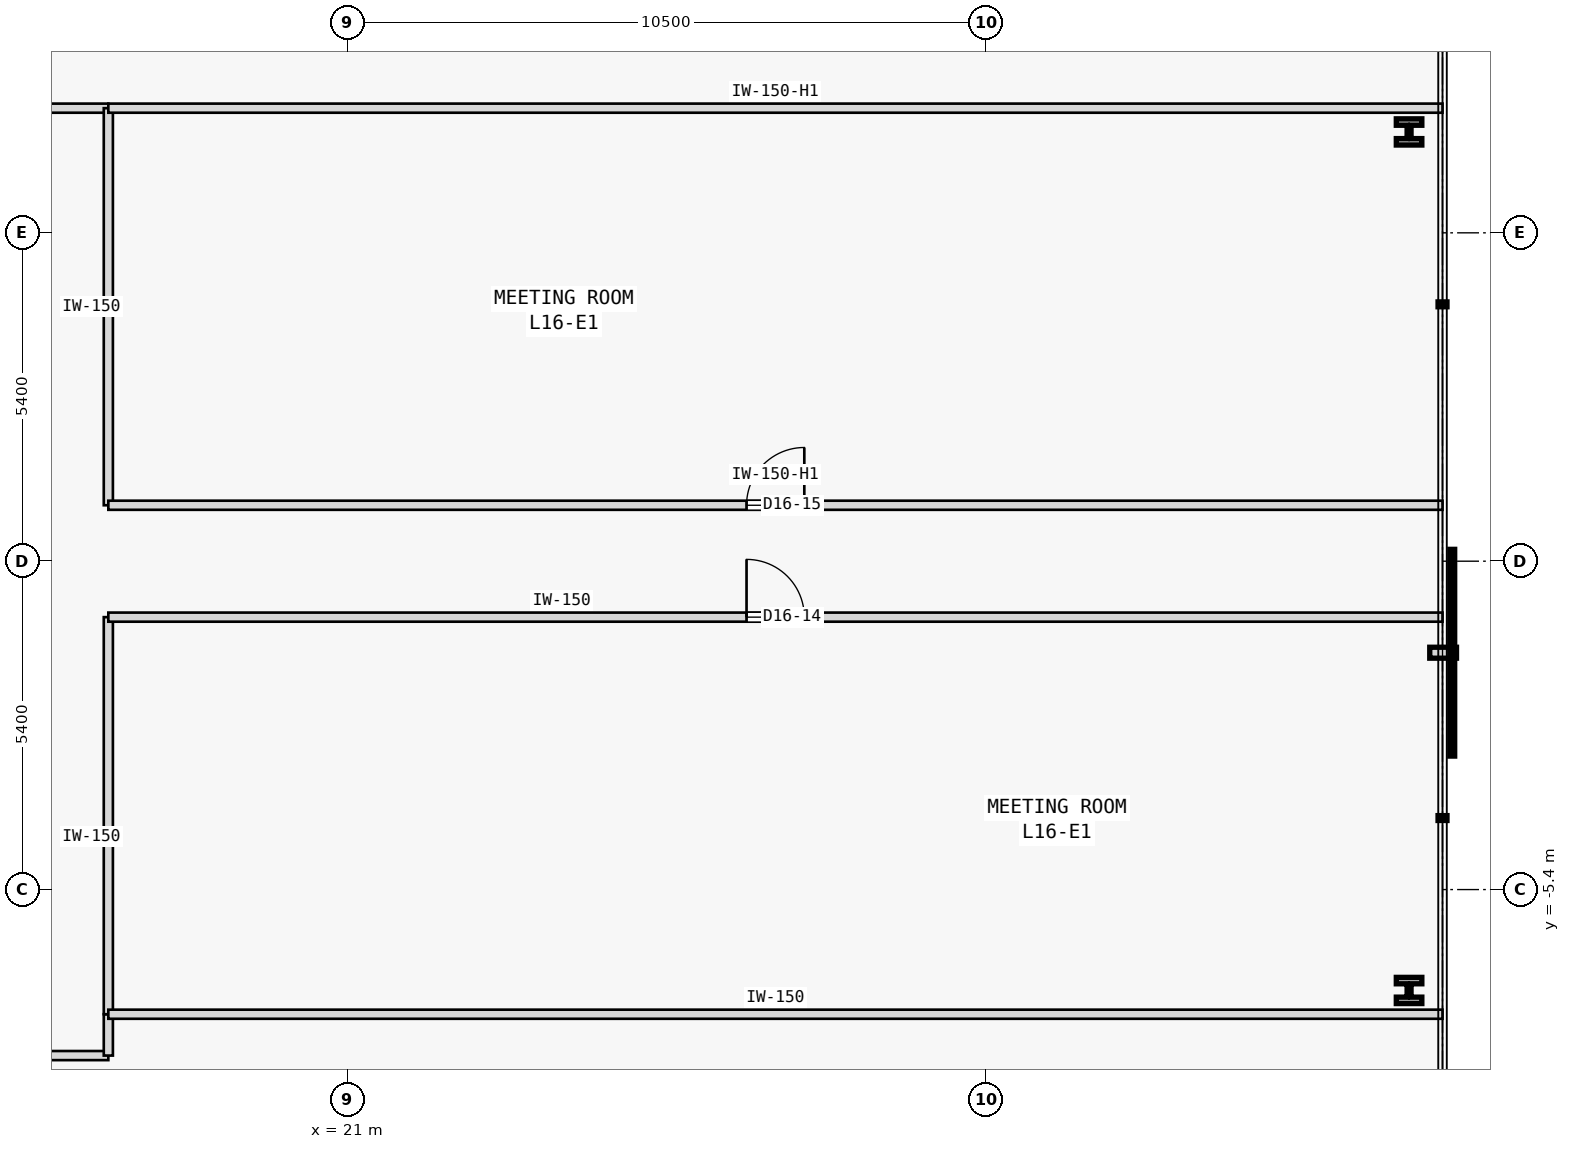
"""IFC4 building model, lengths in metres.
Left out: names, types, materials, properties, quantities, classifications, styles, units other than length and angle.
Written with IfcOpenShell. Run it as: python <this file> out.ifc"""

import sys

from ifc_helpers import new_model, si_unit, direction, frame, frame_2d, origin, origin_2d, place, context, subcontext, project, spatial, rectangle, i_section, extrude, element, fill, save


model = new_model("IFC4")
c1 = context("Model", 3, precision=1e-05, world=origin(), true_north=direction((0.0, 1.0)))
c2 = subcontext(c1, "Body", "Model", "MODEL_VIEW")
j1 = project(units=[si_unit("LENGTHUNIT", "METRE"), si_unit("PLANEANGLEUNIT", "RADIAN")], contexts=[c1])
p1 = place(None, origin())
s1 = spatial("IfcSite", under=j1, at=p1, CompositionType="ELEMENT")
p2 = place(p1, origin())
s2 = spatial("IfcBuilding", under=s1, at=p2, CompositionType="ELEMENT")
p3 = place(p2, frame((0.0, 0.0, 67.4)))
s3 = spatial("IfcBuildingStorey", under=s2, at=p3, CompositionType="ELEMENT", Elevation=67.4)
for number, where, z_axis, x_axis in (
    (1, (38.45, -7.059, 0.0), (0.0, 0.0, 1.0), (1.0, 0.0, 0.0)),
    (2, (38.45, 7.059, 0.0), (0.0, 0.0, 1.0), (1.0, 0.0, 0.0)),
):
    element("IfcColumn", number, at=place(p3, frame(where, z_axis=z_axis, x_axis=x_axis)), inside=s3, PredefinedType="COLUMN", context=c2, shape_type="SweptSolid", body=[
        extrude(i_section(OverallWidth=0.42, OverallDepth=0.431, WebThickness=0.065, FlangeThickness=0.106, FilletRadius=0.015, at=origin_2d()), origin(), (0.0, 0.0, 1.0), 3.8),
    ])
for number, where, z_axis, x_axis in (
    (3, (0.92, 7.45, 0.0), (0.0, 0.0, 1.0), (1.0, 0.0, 0.0)),
    (4, (0.92, -8.13, 0.0), (0.0, 0.0, 1.0), (1.0, 0.0, 0.0)),
):
    element("IfcWall", number, at=place(p3, frame(where, z_axis=z_axis, x_axis=x_axis)), inside=s3, PredefinedType="PARTITIONING", context=c2, shape_type="SweptSolid", body=[
        extrude(rectangle(XDim=16.139, YDim=0.15, at=frame_2d((8.07, 0.0))), origin(), (0.0, 0.0, 1.0), 3.575),
    ])
p4 = place(p3, frame((17.059, -8.13, 0.0), z_axis=(0.0, 0.0, 1.0), x_axis=(0.0, 1.0, 0.0)))
e5 = element("IfcWall", 5, at=p4, inside=s3, PredefinedType="PARTITIONING", context=c2, shape_type="SweptSolid", body=[
    extrude(rectangle(XDim=0.68, YDim=0.15, at=frame_2d((0.34, 0.0))), origin(), (0.0, 0.0, 1.0), 3.575),
])
p5 = place(p3, frame((17.059, -7.45, 0.0), z_axis=(0.0, 0.0, 1.0), x_axis=(0.0, 1.0, 0.0)))
e6 = element("IfcWall", 6, at=p5, inside=s3, PredefinedType="PARTITIONING", context=c2, shape_type="SweptSolid", body=[
    extrude(rectangle(XDim=6.53, YDim=0.15, at=frame_2d((3.265, 0.0))), origin(), (0.0, 0.0, 1.0), 3.575),
])
p6 = place(p3, frame((17.059, -0.92, 0.0), z_axis=(0.0, 0.0, 1.0), x_axis=(1.0, 0.0, 0.0)))
e7 = element("IfcWall", 7, at=p6, inside=s3, PredefinedType="PARTITIONING", context=c2, shape_type="SweptSolid", body=[
    extrude(rectangle(XDim=21.941, YDim=0.15, at=frame_2d((10.97, 0.0))), origin(), (0.0, 0.0, 1.0), 3.575),
])
p7 = place(p6, frame((10.496, 0.0, 0.0)))
e8 = element("IfcOpeningElement", 8, at=p7, cuts=e7, PredefinedType="OPENING", context=c2, shape_type="SweptSolid", body=[
    extrude(rectangle(XDim=0.95, YDim=2.15, at=frame_2d((0.475, 1.075))), frame((0.0, 0.085, 0.0), z_axis=(0.0, -1.0, 0.0), x_axis=(1.0, 0.0, 0.0)), (0.0, 0.0, 1.0), 0.17),
])
p8 = place(p3, frame((17.059, 0.92, 0.0), z_axis=(0.0, 0.0, 1.0), x_axis=(0.0, 1.0, 0.0)))
e9 = element("IfcWall", 9, at=p8, inside=s3, PredefinedType="PARTITIONING", context=c2, shape_type="SweptSolid", body=[
    extrude(rectangle(XDim=6.53, YDim=0.15, at=frame_2d((3.265, 0.0))), origin(), (0.0, 0.0, 1.0), 3.575),
])
p9 = place(p3, frame((17.059, 0.92, 0.0), z_axis=(0.0, 0.0, 1.0), x_axis=(1.0, 0.0, 0.0)))
e10 = element("IfcWall", 10, at=p9, inside=s3, PredefinedType="PARTITIONING", context=c2, shape_type="SweptSolid", body=[
    extrude(rectangle(XDim=21.941, YDim=0.15, at=frame_2d((10.97, 0.0))), origin(), (0.0, 0.0, 1.0), 3.125),
])
p10 = place(p9, frame((10.496, 0.0, 0.0)))
e11 = element("IfcOpeningElement", 11, at=p10, cuts=e10, PredefinedType="OPENING", context=c2, shape_type="SweptSolid", body=[
    extrude(rectangle(XDim=0.95, YDim=2.15, at=frame_2d((0.475, 1.075))), frame((0.0, 0.085, 0.0), z_axis=(0.0, -1.0, 0.0), x_axis=(1.0, 0.0, 0.0)), (0.0, 0.0, 1.0), 0.17),
])
p11 = place(p3, frame((17.059, 7.45, 0.0), z_axis=(0.0, 0.0, 1.0), x_axis=(1.0, 0.0, 0.0)))
e12 = element("IfcWall", 12, at=p11, inside=s3, PredefinedType="PARTITIONING", context=c2, shape_type="SweptSolid", body=[
    extrude(rectangle(XDim=21.941, YDim=0.15, at=frame_2d((10.97, 0.0))), origin(), (0.0, 0.0, 1.0), 3.125),
])
p12 = place(p3, frame((17.059, -7.45, 0.0), z_axis=(0.0, 0.0, 1.0), x_axis=(1.0, 0.0, 0.0)))
e13 = element("IfcWall", 13, at=p12, inside=s3, PredefinedType="PARTITIONING", context=c2, shape_type="SweptSolid", body=[
    extrude(rectangle(XDim=21.941, YDim=0.15, at=frame_2d((10.97, 0.0))), origin(), (0.0, 0.0, 1.0), 3.575),
])
p13 = place(p7, origin())
e14 = element("IfcDoor", 14, at=p13, inside=s3, OperationType="SINGLE_SWING_LEFT", PredefinedType="DOOR", context=c2, shape_type="SweptSolid", body=[
    extrude(rectangle(XDim=0.95, YDim=2.15, at=frame_2d((0.475, 1.075))), frame((0.0, 0.025, 0.0), z_axis=(0.0, -1.0, 0.0), x_axis=(1.0, 0.0, 0.0)), (0.0, 0.0, 1.0), 0.05),
])
fill(e8, e14)
p14 = place(p10, origin())
e15 = element("IfcDoor", 15, at=p14, inside=s3, OperationType="SINGLE_SWING_RIGHT", PredefinedType="DOOR", context=c2, shape_type="SweptSolid", body=[
    extrude(rectangle(XDim=0.95, YDim=2.15, at=frame_2d((0.475, 1.075))), frame((0.0, 0.025, 0.0), z_axis=(0.0, -1.0, 0.0), x_axis=(1.0, 0.0, 0.0)), (0.0, 0.0, 1.0), 0.05),
])
fill(e11, e15)
save(model, sys.argv[1])
